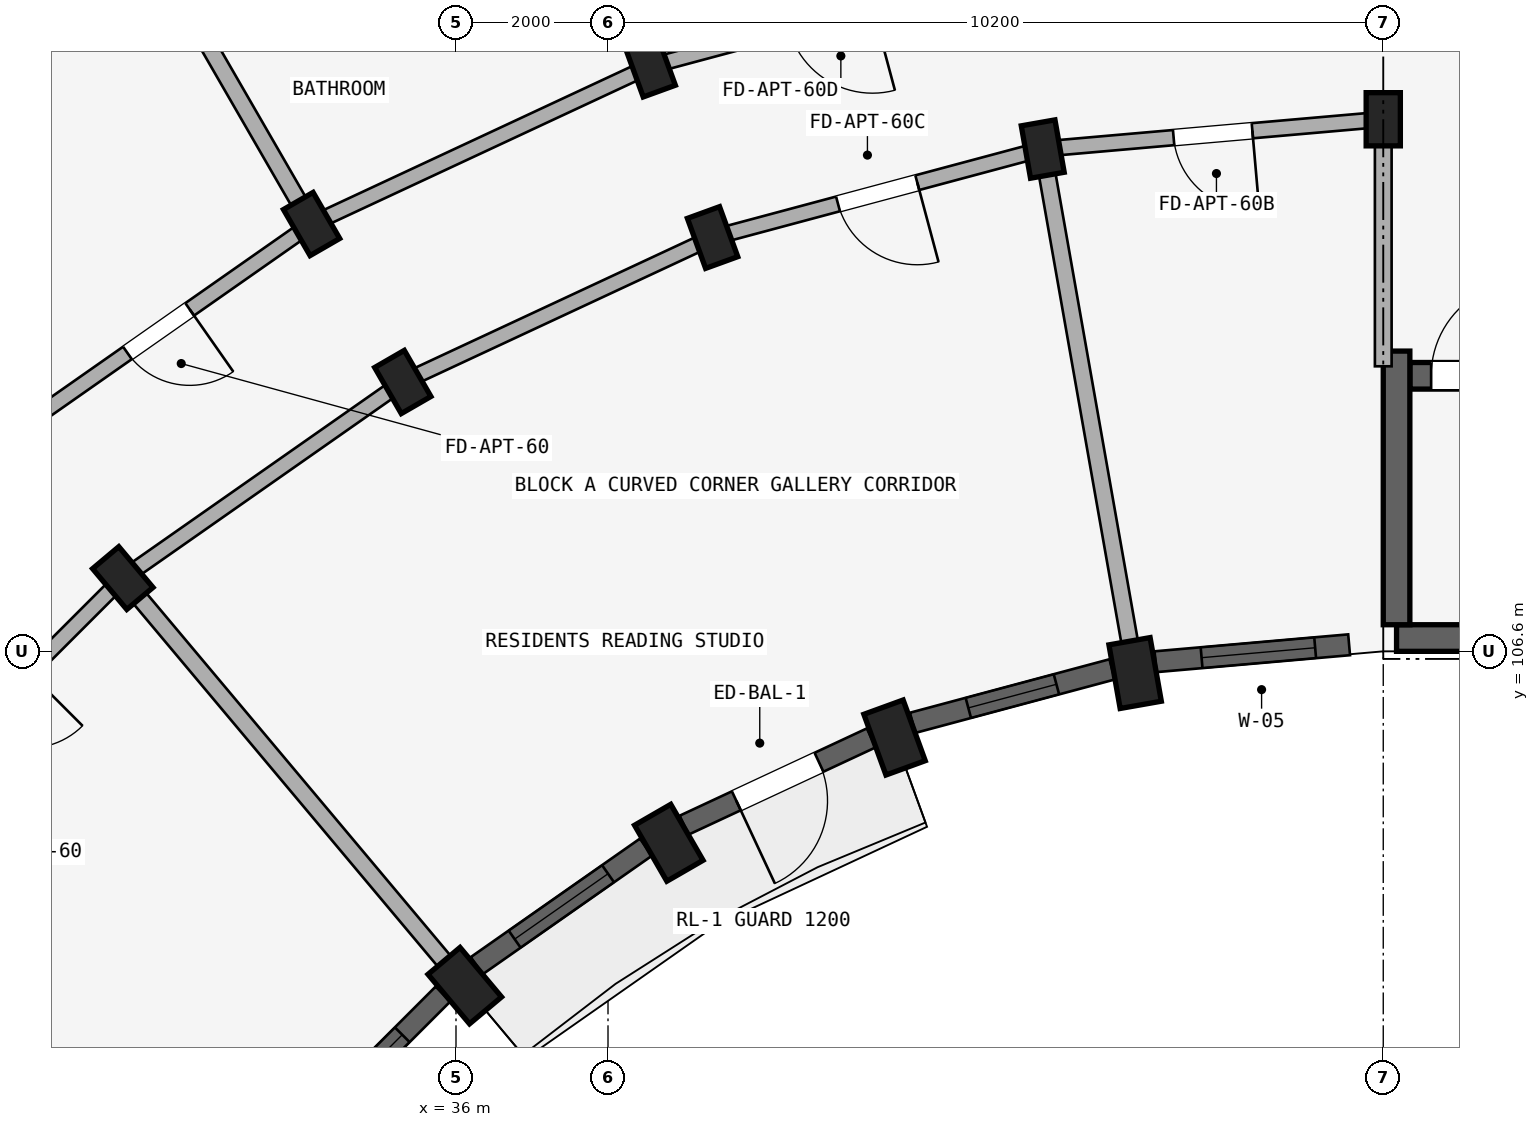
"""IFC4 building model, lengths in metres.
Left out: names, types, materials, properties, quantities, classifications, styles, units other than length and angle.
Written with IfcOpenShell. Run it as: python <this file> out.ifc"""

import sys

from ifc_helpers import new_model, si_unit, direction, frame, frame_2d, origin, origin_2d, place, context, subcontext, project, spatial, rectangle, extrude, element, fill, save


model = new_model("IFC4")
c1 = context("Model", 3, precision=1e-05, world=origin(), true_north=direction((0.0, 1.0)))
c2 = subcontext(c1, "Body", "Model", "MODEL_VIEW")
j1 = project(units=[si_unit("LENGTHUNIT", "METRE"), si_unit("PLANEANGLEUNIT", "RADIAN")], contexts=[c1])
p1 = place(None, origin())
s1 = spatial("IfcSite", under=j1, at=p1, CompositionType="ELEMENT")
p2 = place(p1, origin())
s2 = spatial("IfcBuilding", under=s1, at=p2, CompositionType="ELEMENT")
p3 = place(p2, frame((0.0, 0.0, 15.0)))
s3 = spatial("IfcBuildingStorey", under=s2, at=p3, CompositionType="ELEMENT", Elevation=15.0)
p4 = place(p3, frame((48.375, 106.775, 0.0), z_axis=(0.0, 0.0, 1.0), x_axis=(1.0, 0.0, 0.0)))
e1 = element("IfcWall", 1, at=p4, inside=s3, PredefinedType="SHEAR", context=c2, shape_type="SweptSolid", body=[
    extrude(rectangle(XDim=8.25, YDim=0.35, at=frame_2d((4.125, 0.0))), origin(), (0.0, 0.0, 1.0), 2.93),
])
p5 = place(p3, frame((48.55, 110.225, 0.0), z_axis=(0.0, 0.0, 1.0), x_axis=(1.0, 0.0, 0.0)))
e2 = element("IfcWall", 2, at=p5, inside=s3, PredefinedType="SHEAR", context=c2, shape_type="SweptSolid", body=[
    extrude(rectangle(XDim=7.9, YDim=0.35, at=frame_2d((3.95, 0.0))), origin(), (0.0, 0.0, 1.0), 2.93),
])
p6 = place(p5, frame((0.28, 0.0, 0.0)))
e3 = element("IfcOpeningElement", 3, at=p6, cuts=e2, PredefinedType="OPENING", context=c2, shape_type="SweptSolid", body=[
    extrude(rectangle(XDim=1.24, YDim=2.15, at=frame_2d((0.62, 1.075))), frame((0.0, 0.185, 0.0), z_axis=(0.0, -1.0, 0.0), x_axis=(1.0, 0.0, 0.0)), (0.0, 0.0, 1.0), 0.37),
])
p7 = place(p3, frame((48.375, 106.95, 0.0), z_axis=(0.0, 0.0, 1.0), x_axis=(0.0, 1.0, 0.0)))
e4 = element("IfcWall", 4, at=p7, inside=s3, PredefinedType="SHEAR", context=c2, shape_type="SweptSolid", body=[
    extrude(rectangle(XDim=3.6, YDim=0.35, at=frame_2d((1.8, 0.0))), origin(), (0.0, 0.0, 1.0), 2.93),
])
p8 = place(p3, frame((48.2, 113.6, 0.0), z_axis=(0.0, 0.0, 1.0), x_axis=(1.0, 0.0, 0.0)))
e5 = element("IfcColumn", 5, at=p8, inside=s3, PredefinedType="COLUMN", context=c2, shape_type="SweptSolid", body=[
    extrude(rectangle(XDim=0.45, YDim=0.7, at=origin_2d()), origin(), (0.0, 0.0, 1.0), 2.93),
])
p9 = place(p3, frame((44.935, 106.314, 0.0), z_axis=(0.0, 0.0, 1.0), x_axis=(0.984807753012, 0.173648177667, 0.0)))
e6 = element("IfcColumn", 6, at=p9, inside=s3, PredefinedType="COLUMN", context=c2, shape_type="SweptSolid", body=[
    extrude(rectangle(XDim=0.55, YDim=0.85, at=origin_2d()), origin(), (0.0, 0.0, 1.0), 2.93),
])
p10 = place(p3, frame((43.72, 113.208, 0.0), z_axis=(0.0, 0.0, 1.0), x_axis=(0.984807753012, 0.173648177667, 0.0)))
e7 = element("IfcColumn", 7, at=p10, inside=s3, PredefinedType="COLUMN", context=c2, shape_type="SweptSolid", body=[
    extrude(rectangle(XDim=0.45, YDim=0.7, at=origin_2d()), origin(), (0.0, 0.0, 1.0), 2.93),
])
p11 = place(p3, frame((41.77, 105.466, 0.0), z_axis=(0.0, 0.0, 1.0), x_axis=(0.939692620786, 0.342020143326, 0.0)))
e8 = element("IfcColumn", 8, at=p11, inside=s3, PredefinedType="COLUMN", context=c2, shape_type="SweptSolid", body=[
    extrude(rectangle(XDim=0.55, YDim=0.85, at=origin_2d()), origin(), (0.0, 0.0, 1.0), 2.93),
])
for number, where, z_axis, x_axis in (
    (9, (39.376, 112.044, 0.0), (0.0, 0.0, 1.0), (0.94, 0.342, 0.0)),
    (10, (38.555, 114.299, 0.0), (0.0, 0.0, 1.0), (0.94, 0.342, 0.0)),
):
    element("IfcColumn", number, at=place(p3, frame(where, z_axis=z_axis, x_axis=x_axis)), inside=s3, PredefinedType="COLUMN", context=c2, shape_type="SweptSolid", body=[
        extrude(rectangle(XDim=0.45, YDim=0.7, at=origin_2d()), origin(), (0.0, 0.0, 1.0), 2.93),
    ])
p12 = place(p3, frame((38.8, 104.081, 0.0), z_axis=(0.0, 0.0, 1.0), x_axis=(0.866025403784, 0.5, 0.0)))
e11 = element("IfcColumn", 11, at=p12, inside=s3, PredefinedType="COLUMN", context=c2, shape_type="SweptSolid", body=[
    extrude(rectangle(XDim=0.55, YDim=0.85, at=origin_2d()), origin(), (0.0, 0.0, 1.0), 2.93),
])
for number, where, z_axis, x_axis in (
    (12, (35.3, 110.144, 0.0), (0.0, 0.0, 1.0), (0.866, 0.5, 0.0)),
    (13, (34.1, 112.222, 0.0), (0.0, 0.0, 1.0), (0.866, 0.5, 0.0)),
):
    element("IfcColumn", number, at=place(p3, frame(where, z_axis=z_axis, x_axis=x_axis)), inside=s3, PredefinedType="COLUMN", context=c2, shape_type="SweptSolid", body=[
        extrude(rectangle(XDim=0.45, YDim=0.7, at=origin_2d()), origin(), (0.0, 0.0, 1.0), 2.93),
    ])
p13 = place(p3, frame((36.115, 102.202, 0.0), z_axis=(0.0, 0.0, 1.0), x_axis=(0.766044443119, 0.642787609687, 0.0)))
e14 = element("IfcColumn", 14, at=p13, inside=s3, PredefinedType="COLUMN", context=c2, shape_type="SweptSolid", body=[
    extrude(rectangle(XDim=0.55, YDim=0.85, at=origin_2d()), origin(), (0.0, 0.0, 1.0), 2.93),
])
p14 = place(p3, frame((31.616, 107.564, 0.0), z_axis=(0.0, 0.0, 1.0), x_axis=(0.766044443119, 0.642787609687, 0.0)))
e15 = element("IfcColumn", 15, at=p14, inside=s3, PredefinedType="COLUMN", context=c2, shape_type="SweptSolid", body=[
    extrude(rectangle(XDim=0.45, YDim=0.7, at=origin_2d()), origin(), (0.0, 0.0, 1.0), 2.93),
])
p15 = place(p3, frame((48.2, 113.6, 0.0), z_axis=(0.0, 0.0, 1.0), x_axis=(-0.996191949488, -0.087187153726, 0.0)))
e16 = element("IfcWall", 16, at=p15, inside=s3, PredefinedType="STANDARD", context=c2, shape_type="SweptSolid", body=[
    extrude(rectangle(XDim=4.497, YDim=0.2, at=frame_2d((2.249, 0.0))), origin(), (0.0, 0.0, 1.0), 2.372),
])
p16 = place(p15, frame((1.729, 0.0, 0.0)))
e17 = element("IfcOpeningElement", 17, at=p16, cuts=e16, PredefinedType="OPENING", context=c2, shape_type="SweptSolid", body=[
    extrude(rectangle(XDim=1.04, YDim=2.15, at=frame_2d((0.52, 1.075))), frame((0.0, 0.11, 0.0), z_axis=(0.0, -1.0, 0.0), x_axis=(1.0, 0.0, 0.0)), (0.0, 0.0, 1.0), 0.22),
])
p17 = place(p3, frame((43.72, 113.208, 0.0), z_axis=(0.0, 0.0, 1.0), x_axis=(-0.965934240054, -0.258787642463, 0.0)))
e18 = element("IfcWall", 18, at=p17, inside=s3, PredefinedType="STANDARD", context=c2, shape_type="SweptSolid", body=[
    extrude(rectangle(XDim=4.497, YDim=0.2, at=frame_2d((2.249, 0.0))), origin(), (0.0, 0.0, 1.0), 2.372),
])
p18 = place(p17, frame((1.709, 0.0, 0.0)))
e19 = element("IfcOpeningElement", 19, at=p18, cuts=e18, PredefinedType="OPENING", context=c2, shape_type="SweptSolid", body=[
    extrude(rectangle(XDim=1.08, YDim=2.15, at=frame_2d((0.54, 1.075))), frame((0.0, 0.11, 0.0), z_axis=(0.0, -1.0, 0.0), x_axis=(1.0, 0.0, 0.0)), (0.0, 0.0, 1.0), 0.22),
])
p19 = place(p3, frame((43.303, 115.572, 0.0), z_axis=(0.0, 0.0, 1.0), x_axis=(-0.965930095386, -0.258803112091, 0.0)))
e20 = element("IfcWall", 20, at=p19, inside=s3, PredefinedType="STANDARD", context=c2, shape_type="SweptSolid", body=[
    extrude(rectangle(XDim=4.916, YDim=0.2, at=frame_2d((2.458, 0.0))), origin(), (0.0, 0.0, 1.0), 2.372),
])
p20 = place(p19, frame((1.888, 0.0, 0.0)))
e21 = element("IfcOpeningElement", 21, at=p20, cuts=e20, PredefinedType="OPENING", context=c2, shape_type="SweptSolid", body=[
    extrude(rectangle(XDim=1.14, YDim=2.15, at=frame_2d((0.57, 1.075))), frame((0.0, 0.11, 0.0), z_axis=(0.0, -1.0, 0.0), x_axis=(1.0, 0.0, 0.0)), (0.0, 0.0, 1.0), 0.22),
])
p21 = place(p3, frame((39.376, 112.044, 0.0), z_axis=(0.0, 0.0, 1.0), x_axis=(-0.906307919131, -0.422617978463, 0.0)))
e22 = element("IfcWall", 22, at=p21, inside=s3, PredefinedType="STANDARD", context=c2, shape_type="SweptSolid", body=[
    extrude(rectangle(XDim=4.497, YDim=0.2, at=frame_2d((2.249, 0.0))), origin(), (0.0, 0.0, 1.0), 2.372),
])
p22 = place(p3, frame((38.555, 114.299, 0.0), z_axis=(0.0, 0.0, 1.0), x_axis=(-0.906302381024, -0.422629854778, 0.0)))
e23 = element("IfcWall", 23, at=p22, inside=s3, PredefinedType="STANDARD", context=c2, shape_type="SweptSolid", body=[
    extrude(rectangle(XDim=4.915, YDim=0.2, at=frame_2d((2.458, 0.0))), origin(), (0.0, 0.0, 1.0), 2.372),
])
p23 = place(p3, frame((35.3, 110.144, 0.0), z_axis=(0.0, 0.0, 1.0), x_axis=(-0.819155404658, -0.573571637217, 0.0)))
e24 = element("IfcWall", 24, at=p23, inside=s3, PredefinedType="STANDARD", context=c2, shape_type="SweptSolid", body=[
    extrude(rectangle(XDim=4.497, YDim=0.2, at=frame_2d((2.249, 0.0))), origin(), (0.0, 0.0, 1.0), 2.372),
])
p24 = place(p3, frame((34.1, 112.222, 0.0), z_axis=(0.0, 0.0, 1.0), x_axis=(-0.819140911474, -0.573592335331, 0.0)))
e25 = element("IfcWall", 25, at=p24, inside=s3, PredefinedType="STANDARD", context=c2, shape_type="SweptSolid", body=[
    extrude(rectangle(XDim=4.916, YDim=0.2, at=frame_2d((2.458, 0.0))), origin(), (0.0, 0.0, 1.0), 2.372),
])
p25 = place(p24, frame((1.958, 0.0, 0.0)))
e26 = element("IfcOpeningElement", 26, at=p25, cuts=e25, PredefinedType="OPENING", context=c2, shape_type="SweptSolid", body=[
    extrude(rectangle(XDim=1.0, YDim=2.15, at=frame_2d((0.5, 1.075))), frame((0.0, 0.11, 0.0), z_axis=(0.0, -1.0, 0.0), x_axis=(1.0, 0.0, 0.0)), (0.0, 0.0, 1.0), 0.22),
])
p26 = place(p3, frame((31.616, 107.564, 0.0), z_axis=(0.0, 0.0, 1.0), x_axis=(-0.707106781187, -0.707106781187, 0.0)))
e27 = element("IfcWall", 27, at=p26, inside=s3, PredefinedType="STANDARD", context=c2, shape_type="SweptSolid", body=[
    extrude(rectangle(XDim=4.497, YDim=0.2, at=frame_2d((2.249, 0.0))), origin(), (0.0, 0.0, 1.0), 2.372),
])
p27 = place(p26, frame((1.749, 0.0, 0.0)))
e28 = element("IfcOpeningElement", 28, at=p27, cuts=e27, PredefinedType="OPENING", context=c2, shape_type="SweptSolid", body=[
    extrude(rectangle(XDim=1.0, YDim=2.15, at=frame_2d((0.5, 1.075))), frame((0.0, 0.11, 0.0), z_axis=(0.0, -1.0, 0.0), x_axis=(1.0, 0.0, 0.0)), (0.0, 0.0, 1.0), 0.22),
])
p28 = place(p3, frame((48.2, 110.35, 0.0), z_axis=(0.0, 0.0, 1.0), x_axis=(0.0, 1.0, 0.0)))
e29 = element("IfcWall", 29, at=p28, inside=s3, PredefinedType="STANDARD", context=c2, shape_type="SweptSolid", body=[
    extrude(rectangle(XDim=3.2, YDim=0.22, at=frame_2d((1.6, 0.0))), origin(), (0.0, 0.0, 1.0), 2.372),
])
p29 = place(p3, frame((44.901, 106.511, 0.0), z_axis=(0.0, 0.0, 1.0), x_axis=(-0.173647089161, 0.984807944945, 0.0)))
e30 = element("IfcWall", 30, at=p29, inside=s3, PredefinedType="STANDARD", context=c2, shape_type="SweptSolid", body=[
    extrude(rectangle(XDim=6.75, YDim=0.22, at=frame_2d((3.375, 0.0))), origin(), (0.0, 0.0, 1.0), 2.372),
])
p30 = place(p3, frame((38.521, 114.393, 0.0), z_axis=(0.0, 0.0, 1.0), x_axis=(-0.342022120477, 0.939691901159, 0.0)))
e31 = element("IfcWall", 31, at=p30, inside=s3, PredefinedType="PARTITIONING", context=c2, shape_type="SweptSolid", body=[
    extrude(rectangle(XDim=17.42, YDim=0.15, at=frame_2d((8.71, 0.0))), origin(), (0.0, 0.0, 1.0), 2.372),
])
p31 = place(p30, frame((7.5, 0.0, 0.0)))
e32 = element("IfcOpeningElement", 32, at=p31, cuts=e31, PredefinedType="OPENING", context=c2, shape_type="SweptSolid", body=[
    extrude(rectangle(XDim=0.8, YDim=2.1, at=frame_2d((0.4, 1.05))), frame((0.0, 0.085, 0.0), z_axis=(0.0, -1.0, 0.0), x_axis=(1.0, 0.0, 0.0)), (0.0, 0.0, 1.0), 0.17),
])
p32 = place(p3, frame((34.05, 112.309, 0.0), z_axis=(0.0, 0.0, 1.0), x_axis=(-0.499997843263, 0.866026648973, 0.0)))
e33 = element("IfcWall", 33, at=p32, inside=s3, PredefinedType="STANDARD", context=c2, shape_type="SweptSolid", body=[
    extrude(rectangle(XDim=17.42, YDim=0.22, at=frame_2d((8.71, 0.0))), origin(), (0.0, 0.0, 1.0), 2.372),
])
p33 = place(p3, frame((35.987, 102.355, 0.0), z_axis=(0.0, 0.0, 1.0), x_axis=(-0.642784846501, 0.766046761698, 0.0)))
e34 = element("IfcWall", 34, at=p33, inside=s3, PredefinedType="STANDARD", context=c2, shape_type="SweptSolid", body=[
    extrude(rectangle(XDim=6.75, YDim=0.22, at=frame_2d((3.375, 0.0))), origin(), (0.0, 0.0, 1.0), 2.372),
])
p34 = place(p3, frame((47.751, 106.686, 0.0), z_axis=(0.0, 0.0, 1.0), x_axis=(-0.996194235595, -0.08716102895, 0.0)))
e35 = element("IfcWall", 35, at=p34, inside=s3, PredefinedType="STANDARD", context=c2, shape_type="SweptSolid", body=[
    extrude(rectangle(XDim=2.557, YDim=0.275, at=frame_2d((1.279, 0.0))), origin(), (0.0, 0.0, 1.0), 2.472),
])
p35 = place(p34, frame((0.448, 0.0, 0.622)))
e36 = element("IfcOpeningElement", 36, at=p35, cuts=e35, PredefinedType="OPENING", context=c2, shape_type="SweptSolid", body=[
    extrude(rectangle(XDim=1.5, YDim=1.65, at=frame_2d((0.75, 0.825))), frame((0.0, 0.147, 0.0), z_axis=(0.0, -1.0, 0.0), x_axis=(1.0, 0.0, 0.0)), (0.0, 0.0, 1.0), 0.295),
])
p36 = place(p3, frame((44.633, 106.363, 0.0), z_axis=(0.0, 0.0, 1.0), x_axis=(-0.965925595341, -0.258819907011, 0.0)))
e37 = element("IfcWall", 37, at=p36, inside=s3, PredefinedType="STANDARD", context=c2, shape_type="SweptSolid", body=[
    extrude(rectangle(XDim=2.718, YDim=0.275, at=frame_2d((1.359, 0.0))), origin(), (0.0, 0.0, 1.0), 2.472),
])
p37 = place(p36, frame((0.759, 0.0, 0.772)))
e38 = element("IfcOpeningElement", 38, at=p37, cuts=e37, PredefinedType="OPENING", context=c2, shape_type="SweptSolid", body=[
    extrude(rectangle(XDim=1.2, YDim=1.5, at=frame_2d((0.6, 0.75))), frame((0.0, 0.147, 0.0), z_axis=(0.0, -1.0, 0.0), x_axis=(1.0, 0.0, 0.0)), (0.0, 0.0, 1.0), 0.295),
])
p38 = place(p3, frame((41.464, 105.461, 0.0), z_axis=(0.0, 0.0, 1.0), x_axis=(-0.906311629168, -0.422610022166, 0.0)))
e39 = element("IfcWall", 39, at=p38, inside=s3, PredefinedType="STANDARD", context=c2, shape_type="SweptSolid", body=[
    extrude(rectangle(XDim=2.718, YDim=0.275, at=frame_2d((1.359, 0.0))), origin(), (0.0, 0.0, 1.0), 2.472),
])
p39 = place(p38, frame((0.759, 0.0, 0.0)))
e40 = element("IfcOpeningElement", 40, at=p39, cuts=e39, PredefinedType="OPENING", context=c2, shape_type="SweptSolid", body=[
    extrude(rectangle(XDim=1.2, YDim=2.15, at=frame_2d((0.6, 1.075))), frame((0.0, 0.147, 0.0), z_axis=(0.0, -1.0, 0.0), x_axis=(1.0, 0.0, 0.0)), (0.0, 0.0, 1.0), 0.295),
])
p40 = place(p3, frame((38.499, 104.023, 0.0), z_axis=(0.0, 0.0, 1.0), x_axis=(-0.81917282593, -0.573546755948, 0.0)))
e41 = element("IfcWall", 41, at=p40, inside=s3, PredefinedType="STANDARD", context=c2, shape_type="SweptSolid", body=[
    extrude(rectangle(XDim=2.718, YDim=0.275, at=frame_2d((1.359, 0.0))), origin(), (0.0, 0.0, 1.0), 2.472),
])
p41 = place(p40, frame((0.609, 0.0, 0.622)))
e42 = element("IfcOpeningElement", 42, at=p41, cuts=e41, PredefinedType="OPENING", context=c2, shape_type="SweptSolid", body=[
    extrude(rectangle(XDim=1.5, YDim=1.65, at=frame_2d((0.75, 0.825))), frame((0.0, 0.147, 0.0), z_axis=(0.0, -1.0, 0.0), x_axis=(1.0, 0.0, 0.0)), (0.0, 0.0, 1.0), 0.295),
])
p42 = place(p3, frame((35.829, 102.092, 0.0), z_axis=(0.0, 0.0, 1.0), x_axis=(-0.707106781187, -0.707106781187, 0.0)))
e43 = element("IfcWall", 43, at=p42, inside=s3, PredefinedType="STANDARD", context=c2, shape_type="SweptSolid", body=[
    extrude(rectangle(XDim=2.718, YDim=0.275, at=frame_2d((1.359, 0.0))), origin(), (0.0, 0.0, 1.0), 2.472),
])
p43 = place(p42, frame((0.759, 0.0, 0.772)))
e44 = element("IfcOpeningElement", 44, at=p43, cuts=e43, PredefinedType="OPENING", context=c2, shape_type="SweptSolid", body=[
    extrude(rectangle(XDim=1.2, YDim=1.5, at=frame_2d((0.6, 0.75))), frame((0.0, 0.147, 0.0), z_axis=(0.0, -1.0, 0.0), x_axis=(1.0, 0.0, 0.0)), (0.0, 0.0, 1.0), 0.295),
])
p44 = place(p35, origin())
e45 = element("IfcWindow", 45, at=p44, inside=s3, PartitioningType="DOUBLE_PANEL_VERTICAL", PredefinedType="WINDOW", context=c2, shape_type="SweptSolid", body=[
    extrude(rectangle(XDim=1.5, YDim=1.65, at=frame_2d((0.75, 0.825))), frame((0.0, 0.03, 0.0), z_axis=(0.0, -1.0, 0.0), x_axis=(1.0, 0.0, 0.0)), (0.0, 0.0, 1.0), 0.06),
])
fill(e36, e45)
p45 = place(p37, origin())
e46 = element("IfcWindow", 46, at=p45, inside=s3, PartitioningType="SINGLE_PANEL", PredefinedType="WINDOW", context=c2, shape_type="SweptSolid", body=[
    extrude(rectangle(XDim=1.2, YDim=1.5, at=frame_2d((0.6, 0.75))), frame((0.0, 0.03, 0.0), z_axis=(0.0, -1.0, 0.0), x_axis=(1.0, 0.0, 0.0)), (0.0, 0.0, 1.0), 0.06),
])
fill(e38, e46)
p46 = place(p41, origin())
e47 = element("IfcWindow", 47, at=p46, inside=s3, PartitioningType="DOUBLE_PANEL_VERTICAL", PredefinedType="WINDOW", context=c2, shape_type="SweptSolid", body=[
    extrude(rectangle(XDim=1.5, YDim=1.65, at=frame_2d((0.75, 0.825))), frame((0.0, 0.03, 0.0), z_axis=(0.0, -1.0, 0.0), x_axis=(1.0, 0.0, 0.0)), (0.0, 0.0, 1.0), 0.06),
])
fill(e42, e47)
p47 = place(p43, origin())
e48 = element("IfcWindow", 48, at=p47, inside=s3, PartitioningType="SINGLE_PANEL", PredefinedType="WINDOW", context=c2, shape_type="SweptSolid", body=[
    extrude(rectangle(XDim=1.2, YDim=1.5, at=frame_2d((0.6, 0.75))), frame((0.0, 0.03, 0.0), z_axis=(0.0, -1.0, 0.0), x_axis=(1.0, 0.0, 0.0)), (0.0, 0.0, 1.0), 0.06),
])
fill(e44, e48)
p48 = place(p6, frame((1.24, 0.0, 0.0), z_axis=(0.0, 0.0, 1.0), x_axis=(-1.0, 0.0, 0.0)))
e49 = element("IfcDoor", 49, at=p48, inside=s3, OperationType="SINGLE_SWING_LEFT", PredefinedType="DOOR", context=c2, shape_type="SweptSolid", body=[
    extrude(rectangle(XDim=1.24, YDim=2.15, at=frame_2d((0.62, 1.075))), frame((0.0, 0.025, 0.0), z_axis=(0.0, -1.0, 0.0), x_axis=(1.0, 0.0, 0.0)), (0.0, 0.0, 1.0), 0.05),
])
fill(e3, e49)
p49 = place(p25, frame((1.0, 0.0, 0.0), z_axis=(0.0, 0.0, 1.0), x_axis=(-1.0, 0.0, 0.0)))
e50 = element("IfcDoor", 50, at=p49, inside=s3, OperationType="SINGLE_SWING_RIGHT", PredefinedType="DOOR", context=c2, shape_type="SweptSolid", body=[
    extrude(rectangle(XDim=1.0, YDim=2.15, at=frame_2d((0.5, 1.075))), frame((0.0, 0.025, 0.0), z_axis=(0.0, -1.0, 0.0), x_axis=(1.0, 0.0, 0.0)), (0.0, 0.0, 1.0), 0.05),
])
fill(e26, e50)
p50 = place(p16, frame((1.04, 0.0, 0.0), z_axis=(0.0, 0.0, 1.0), x_axis=(-1.0, 0.0, 0.0)))
e51 = element("IfcDoor", 51, at=p50, inside=s3, OperationType="SINGLE_SWING_RIGHT", PredefinedType="DOOR", context=c2, shape_type="SweptSolid", body=[
    extrude(rectangle(XDim=1.04, YDim=2.15, at=frame_2d((0.52, 1.075))), frame((0.0, 0.025, 0.0), z_axis=(0.0, -1.0, 0.0), x_axis=(1.0, 0.0, 0.0)), (0.0, 0.0, 1.0), 0.05),
])
fill(e17, e51)
p51 = place(p18, origin())
e52 = element("IfcDoor", 52, at=p51, inside=s3, OperationType="SINGLE_SWING_LEFT", PredefinedType="DOOR", context=c2, shape_type="SweptSolid", body=[
    extrude(rectangle(XDim=1.08, YDim=2.15, at=frame_2d((0.54, 1.075))), frame((0.0, 0.025, 0.0), z_axis=(0.0, -1.0, 0.0), x_axis=(1.0, 0.0, 0.0)), (0.0, 0.0, 1.0), 0.05),
])
fill(e19, e52)
p52 = place(p39, origin())
e53 = element("IfcDoor", 53, at=p52, inside=s3, OperationType="SINGLE_SWING_RIGHT", PredefinedType="DOOR", context=c2, shape_type="SweptSolid", body=[
    extrude(rectangle(XDim=1.2, YDim=2.15, at=frame_2d((0.6, 1.075))), frame((0.0, 0.025, 0.0), z_axis=(0.0, -1.0, 0.0), x_axis=(1.0, 0.0, 0.0)), (0.0, 0.0, 1.0), 0.05),
])
fill(e40, e53)
save(model, sys.argv[1])
